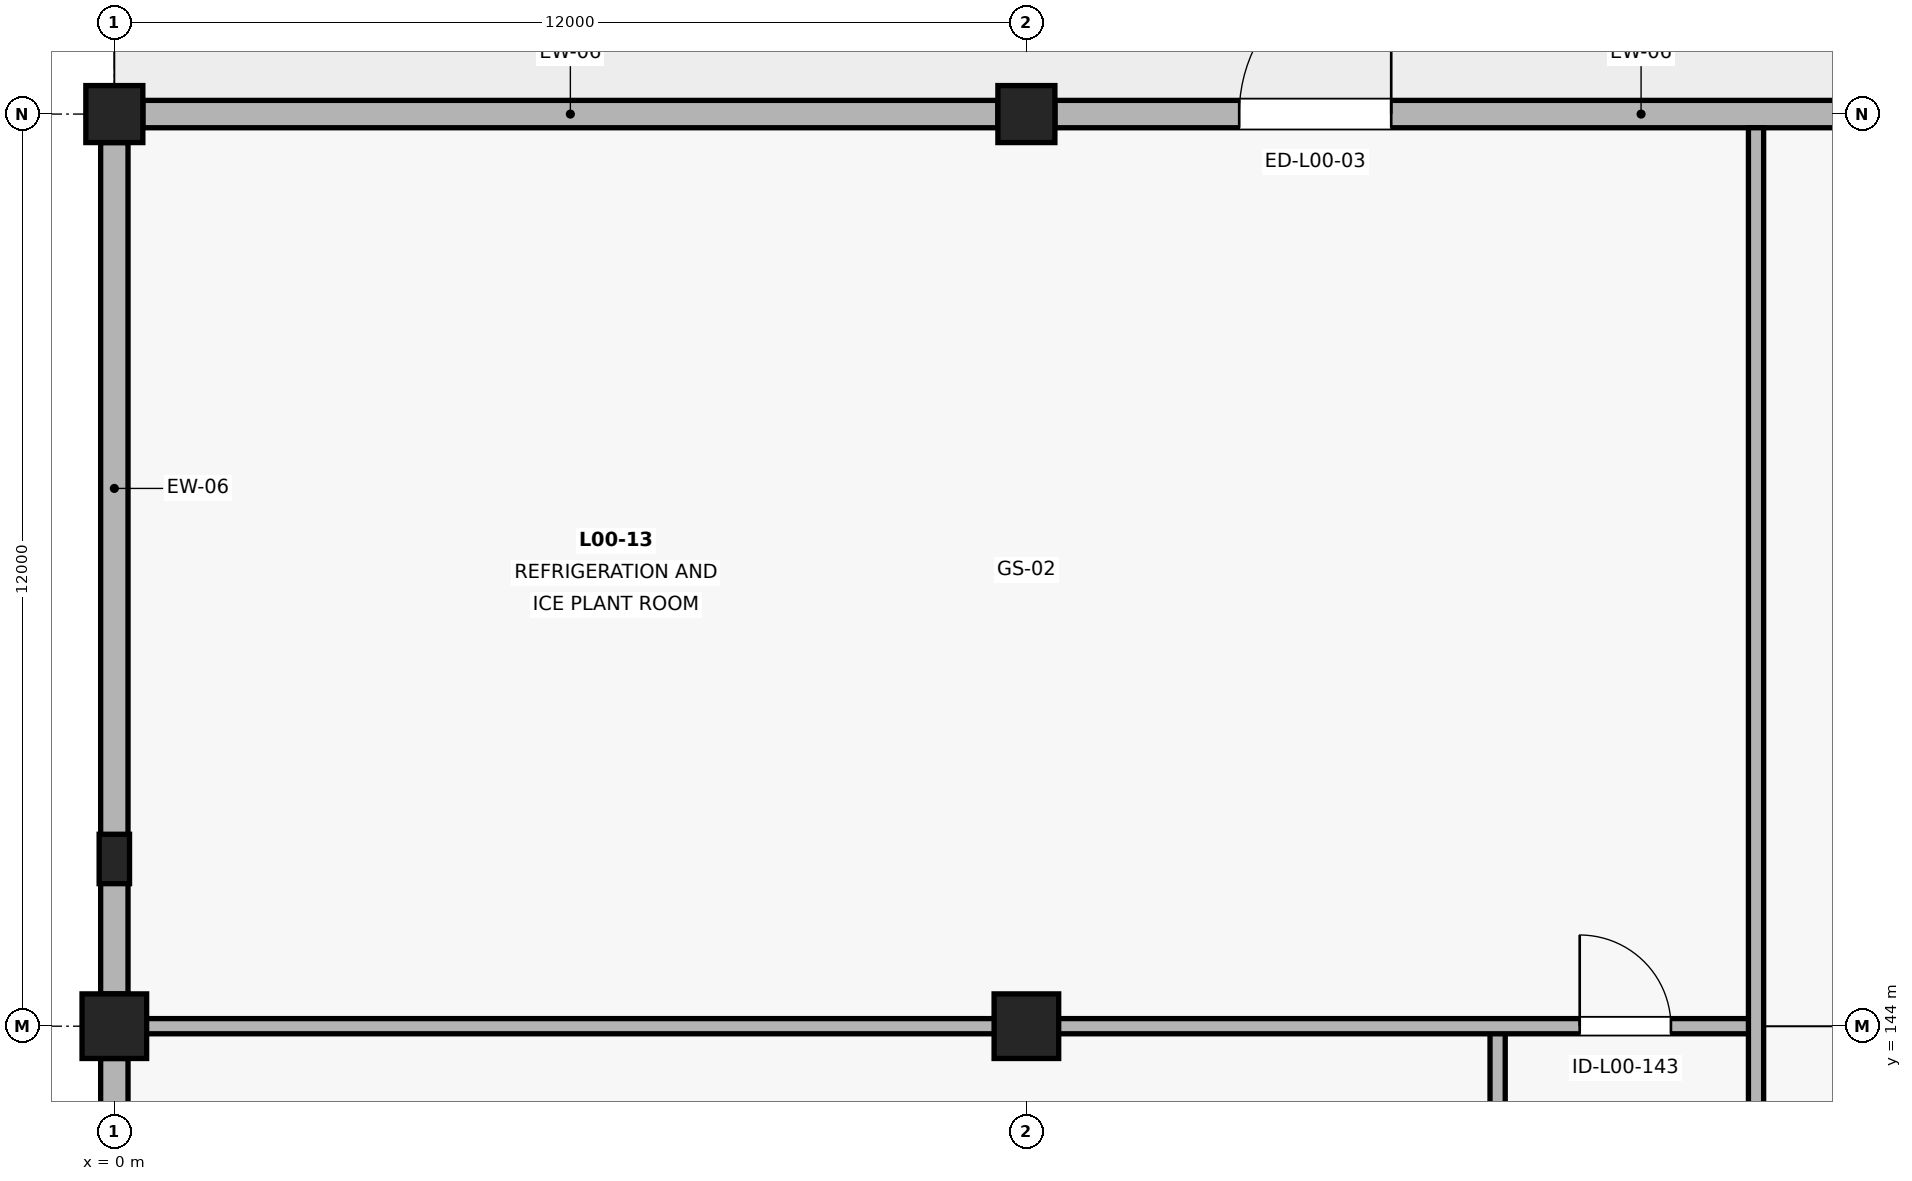
"""IFC4 building model, lengths in metres.
Left out: names, types, materials, properties, quantities, classifications, styles, units other than length and angle.
Written with IfcOpenShell. Run it as: python <this file> out.ifc"""

import sys

from ifc_helpers import new_model, si_unit, direction, frame, frame_2d, origin, origin_2d, place, context, subcontext, project, spatial, rectangle, extrude, element, fill, save


model = new_model("IFC4")
c1 = context("Model", 3, precision=1e-05, world=origin(), true_north=direction((0.0, 1.0)))
c2 = subcontext(c1, "Body", "Model", "MODEL_VIEW")
j1 = project(units=[si_unit("LENGTHUNIT", "METRE"), si_unit("PLANEANGLEUNIT", "RADIAN")], contexts=[c1])
p1 = place(None, origin())
s1 = spatial("IfcSite", under=j1, at=p1, CompositionType="ELEMENT")
p2 = place(p1, origin())
s2 = spatial("IfcBuilding", under=s1, at=p2, CompositionType="ELEMENT")
p3 = place(p2, origin())
s3 = spatial("IfcBuildingStorey", under=s2, at=p3, CompositionType="ELEMENT", Elevation=0.0)
p4 = place(p3, frame((0.0, 144.0, 0.0), z_axis=(0.0, 0.0, 1.0), x_axis=(1.0, 0.0, 0.0)))
e1 = element("IfcColumn", 1, at=p4, inside=s3, PredefinedType="COLUMN", context=c2, shape_type="SweptSolid", body=[
    extrude(rectangle(XDim=0.85, YDim=0.85, at=origin_2d()), origin(), (0.0, 0.0, 1.0), 6.6),
])
p5 = place(p3, frame((0.0, 146.2, 0.0), z_axis=(0.0, 0.0, 1.0), x_axis=(1.0, 0.0, 0.0)))
e2 = element("IfcColumn", 2, at=p5, inside=s3, PredefinedType="PILASTER", context=c2, shape_type="SweptSolid", body=[
    extrude(rectangle(XDim=0.4, YDim=0.65, at=origin_2d()), origin(), (0.0, 0.0, 1.0), 6.6),
])
p6 = place(p3, frame((0.0, 156.0, 0.0), z_axis=(0.0, 0.0, 1.0), x_axis=(1.0, 0.0, 0.0)))
e3 = element("IfcColumn", 3, at=p6, inside=s3, PredefinedType="COLUMN", context=c2, shape_type="SweptSolid", body=[
    extrude(rectangle(XDim=0.75, YDim=0.75, at=origin_2d()), origin(), (0.0, 0.0, 1.0), 6.6),
])
p7 = place(p3, frame((12.0, 144.0, 0.0), z_axis=(0.0, 0.0, 1.0), x_axis=(1.0, 0.0, 0.0)))
e4 = element("IfcColumn", 4, at=p7, inside=s3, PredefinedType="COLUMN", context=c2, shape_type="SweptSolid", body=[
    extrude(rectangle(XDim=0.85, YDim=0.85, at=origin_2d()), origin(), (0.0, 0.0, 1.0), 6.6),
])
p8 = place(p3, frame((12.0, 156.0, 0.0), z_axis=(0.0, 0.0, 1.0), x_axis=(1.0, 0.0, 0.0)))
e5 = element("IfcColumn", 5, at=p8, inside=s3, PredefinedType="COLUMN", context=c2, shape_type="SweptSolid", body=[
    extrude(rectangle(XDim=0.75, YDim=0.75, at=origin_2d()), origin(), (0.0, 0.0, 1.0), 6.6),
])
p9 = place(p3, frame((0.0, 132.425, 0.0), z_axis=(0.0, 0.0, 1.0), x_axis=(0.0, 1.0, 0.0)))
e6 = element("IfcWall", 6, at=p9, inside=s3, PredefinedType="SOLIDWALL", context=c2, shape_type="SweptSolid", body=[
    extrude(rectangle(XDim=11.15, YDim=0.36, at=frame_2d((5.575, 0.0))), origin(), (0.0, 0.0, 1.0), 5.048),
])
p10 = place(p9, frame((5.175, 0.0, 0.0)))
e7 = element("IfcOpeningElement", 7, at=p10, cuts=e6, PredefinedType="OPENING", context=c2, shape_type="SweptSolid", body=[
    extrude(rectangle(XDim=1.2, YDim=2.2, at=frame_2d((0.6, 1.1))), frame((0.0, 0.195, 0.0), z_axis=(0.0, -1.0, 0.0), x_axis=(1.0, 0.0, 0.0)), (0.0, 0.0, 1.0), 0.39),
])
p11 = place(p3, frame((0.0, 144.425, 0.0), z_axis=(0.0, 0.0, 1.0), x_axis=(0.0, 1.0, 0.0)))
e8 = element("IfcWall", 8, at=p11, inside=s3, PredefinedType="SOLIDWALL", context=c2, shape_type="SweptSolid", body=[
    extrude(rectangle(XDim=11.2, YDim=0.36, at=frame_2d((5.6, 0.0))), origin(), (0.0, 0.0, 1.0), 5.258),
])
p12 = place(p3, frame((0.375, 156.0, 0.0), z_axis=(0.0, 0.0, 1.0), x_axis=(1.0, 0.0, 0.0)))
e9 = element("IfcWall", 9, at=p12, inside=s3, PredefinedType="SOLIDWALL", context=c2, shape_type="SweptSolid", body=[
    extrude(rectangle(XDim=11.25, YDim=0.36, at=frame_2d((5.625, 0.0))), origin(), (0.0, 0.0, 1.0), 5.058),
])
p13 = place(p3, frame((12.375, 156.0, 0.0), z_axis=(0.0, 0.0, 1.0), x_axis=(1.0, 0.0, 0.0)))
e10 = element("IfcWall", 10, at=p13, inside=s3, PredefinedType="SOLIDWALL", context=c2, shape_type="SweptSolid", body=[
    extrude(rectangle(XDim=11.25, YDim=0.36, at=frame_2d((5.625, 0.0))), origin(), (0.0, 0.0, 1.0), 5.058),
])
p14 = place(p13, frame((2.425, 0.0, 0.0)))
e11 = element("IfcOpeningElement", 11, at=p14, cuts=e10, PredefinedType="OPENING", context=c2, shape_type="SweptSolid", body=[
    extrude(rectangle(XDim=2.0, YDim=2.2, at=frame_2d((1.0, 1.1))), frame((0.0, 0.195, 0.0), z_axis=(0.0, -1.0, 0.0), x_axis=(1.0, 0.0, 0.0)), (0.0, 0.0, 1.0), 0.39),
])
p15 = place(p3, frame((18.2, 127.65, 0.0), z_axis=(0.0, 0.0, 1.0), x_axis=(0.0, 1.0, 0.0)))
e12 = element("IfcWall", 12, at=p15, inside=s3, PredefinedType="PARTITIONING", context=c2, shape_type="SweptSolid", body=[
    extrude(rectangle(XDim=16.35, YDim=0.2, at=frame_2d((8.175, 0.0))), origin(), (0.0, 0.0, 1.0), 4.833),
])
p16 = place(p15, frame((6.0, 0.0, 0.0)))
e13 = element("IfcOpeningElement", 13, at=p16, cuts=e12, PredefinedType="OPENING", context=c2, shape_type="SweptSolid", body=[
    extrude(rectangle(XDim=2.4, YDim=2.6, at=frame_2d((1.2, 1.3))), frame((0.0, 0.115, 0.0), z_axis=(0.0, -1.0, 0.0), x_axis=(1.0, 0.0, 0.0)), (0.0, 0.0, 1.0), 0.23),
])
p17 = place(p3, frame((0.18, 144.0, 0.0), z_axis=(0.0, 0.0, 1.0), x_axis=(1.0, 0.0, 0.0)))
e14 = element("IfcWall", 14, at=p17, inside=s3, PredefinedType="PARTITIONING", context=c2, shape_type="SweptSolid", body=[
    extrude(rectangle(XDim=21.42, YDim=0.2, at=frame_2d((10.71, 0.0))), origin(), (0.0, 0.0, 1.0), 4.833),
])
p18 = place(p17, frame((19.1, 0.0, 0.0)))
e15 = element("IfcOpeningElement", 15, at=p18, cuts=e14, PredefinedType="OPENING", context=c2, shape_type="SweptSolid", body=[
    extrude(rectangle(XDim=1.2, YDim=2.2, at=frame_2d((0.6, 1.1))), frame((0.0, 0.115, 0.0), z_axis=(0.0, -1.0, 0.0), x_axis=(1.0, 0.0, 0.0)), (0.0, 0.0, 1.0), 0.23),
])
p19 = place(p3, frame((21.6, 36.18, 0.0), z_axis=(0.0, 0.0, 1.0), x_axis=(0.0, 1.0, 0.0)))
e16 = element("IfcWall", 16, at=p19, inside=s3, PredefinedType="PARTITIONING", context=c2, shape_type="SweptSolid", body=[
    extrude(rectangle(XDim=119.64, YDim=0.2, at=frame_2d((59.82, 0.0))), origin(), (0.0, 0.0, 1.0), 4.733),
])
p20 = place(p19, frame((6.8, 0.0, 0.0)))
e17 = element("IfcOpeningElement", 17, at=p20, cuts=e16, PredefinedType="OPENING", context=c2, shape_type="SweptSolid", body=[
    extrude(rectangle(XDim=2.4, YDim=2.6, at=frame_2d((1.2, 1.3))), frame((0.0, 0.115, 0.0), z_axis=(0.0, -1.0, 0.0), x_axis=(1.0, 0.0, 0.0)), (0.0, 0.0, 1.0), 0.23),
])
p21 = place(p19, frame((78.8, 0.0, 0.0)))
e18 = element("IfcOpeningElement", 18, at=p21, cuts=e16, PredefinedType="OPENING", context=c2, shape_type="SweptSolid", body=[
    extrude(rectangle(XDim=2.4, YDim=2.6, at=frame_2d((1.2, 1.3))), frame((0.0, 0.115, 0.0), z_axis=(0.0, -1.0, 0.0), x_axis=(1.0, 0.0, 0.0)), (0.0, 0.0, 1.0), 0.23),
])
p22 = place(p14, origin())
e19 = element("IfcDoor", 19, at=p22, inside=s3, OperationType="SINGLE_SWING_RIGHT", PredefinedType="DOOR", context=c2, shape_type="SweptSolid", body=[
    extrude(rectangle(XDim=2.0, YDim=2.2, at=frame_2d((1.0, 1.1))), frame((0.0, 0.025, 0.0), z_axis=(0.0, -1.0, 0.0), x_axis=(1.0, 0.0, 0.0)), (0.0, 0.0, 1.0), 0.05),
])
fill(e11, e19)
p23 = place(p18, origin())
e20 = element("IfcDoor", 20, at=p23, inside=s3, OperationType="SINGLE_SWING_LEFT", PredefinedType="DOOR", context=c2, shape_type="SweptSolid", body=[
    extrude(rectangle(XDim=1.2, YDim=2.2, at=frame_2d((0.6, 1.1))), frame((0.0, 0.025, 0.0), z_axis=(0.0, -1.0, 0.0), x_axis=(1.0, 0.0, 0.0)), (0.0, 0.0, 1.0), 0.05),
])
fill(e15, e20)
save(model, sys.argv[1])
